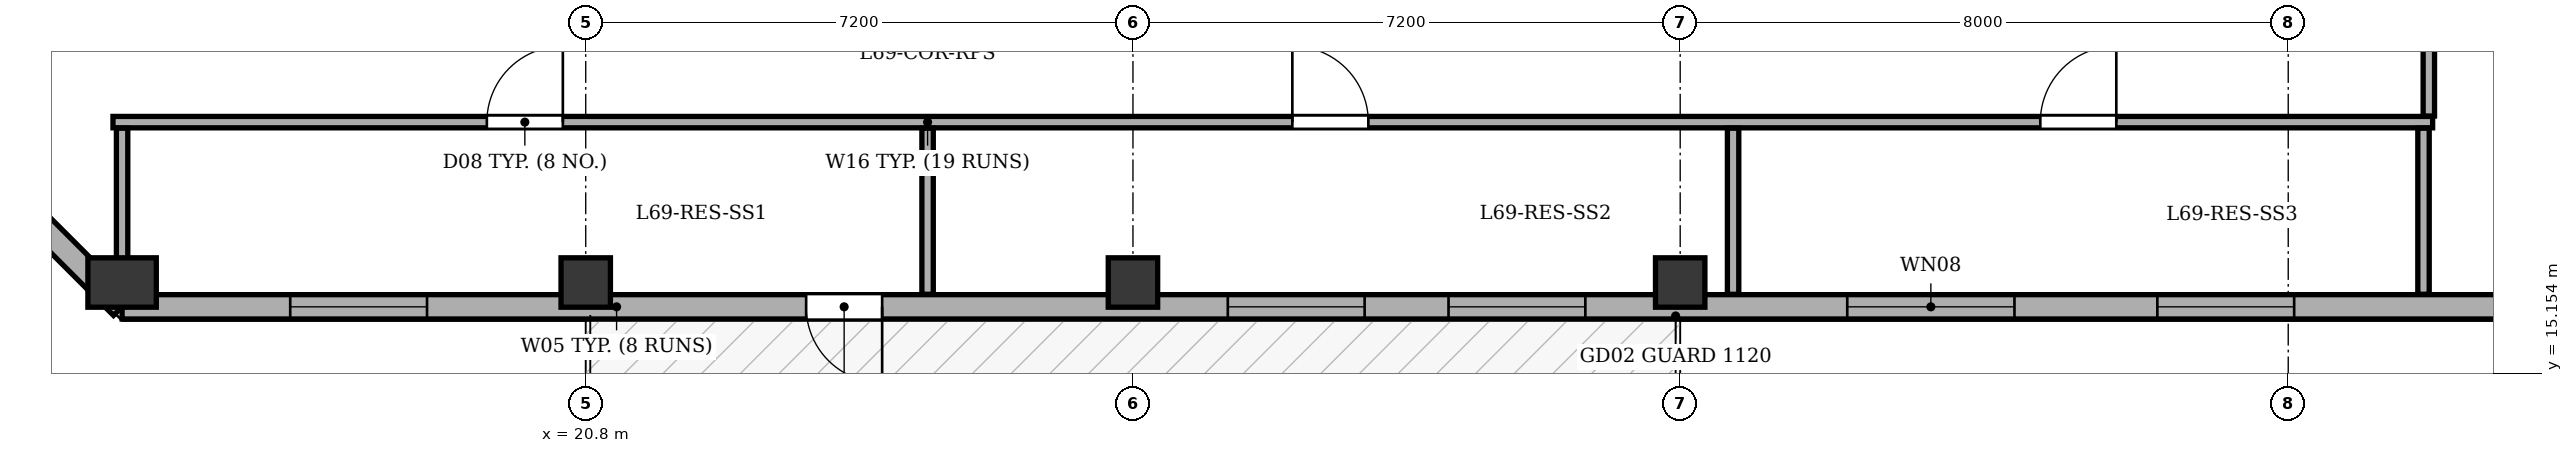
"""IFC4 building model, lengths in metres.
Left out: names, types, materials, properties, quantities, classifications, styles, units other than length and angle.
Written with IfcOpenShell. Run it as: python <this file> out.ifc"""

import sys

from ifc_helpers import new_model, si_unit, direction, frame, frame_2d, origin, origin_2d, place, context, subcontext, project, spatial, rectangle, extrude, element, fill, save


model = new_model("IFC4")
c1 = context("Model", 3, precision=1e-05, world=origin(), true_north=direction((0.0, 1.0)))
c2 = subcontext(c1, "Body", "Model", "MODEL_VIEW")
j1 = project(units=[si_unit("LENGTHUNIT", "METRE"), si_unit("PLANEANGLEUNIT", "RADIAN")], contexts=[c1])
p1 = place(None, origin())
s1 = spatial("IfcSite", under=j1, at=p1, CompositionType="ELEMENT")
p2 = place(p1, origin())
s2 = spatial("IfcBuilding", under=s1, at=p2, CompositionType="ELEMENT")
p3 = place(p2, frame((0.0, 0.0, 261.9)))
s3 = spatial("IfcBuildingStorey", under=s2, at=p3, CompositionType="ELEMENT", Elevation=261.9)
p4 = place(p3, frame((14.7, 16.35, 0.0), z_axis=(0.0, 0.0, 1.0), x_axis=(1.0, 0.0, 0.0)))
e1 = element("IfcColumn", 1, at=p4, inside=s3, PredefinedType="COLUMN", context=c2, shape_type="SweptSolid", body=[
    extrude(rectangle(XDim=0.65, YDim=0.9, at=origin_2d()), origin(), (0.0, 0.0, 1.0), 3.4),
])
for number, where, z_axis, x_axis in (
    (2, (20.8, 16.35, 0.0), (0.0, 0.0, 1.0), (1.0, 0.0, 0.0)),
    (3, (28.0, 16.35, 0.0), (0.0, 0.0, 1.0), (1.0, 0.0, 0.0)),
    (4, (35.2, 16.35, 0.0), (0.0, 0.0, 1.0), (1.0, 0.0, 0.0)),
):
    element("IfcColumn", number, at=place(p3, frame(where, z_axis=z_axis, x_axis=x_axis)), inside=s3, PredefinedType="COLUMN", context=c2, shape_type="SweptSolid", body=[
        extrude(rectangle(XDim=0.65, YDim=0.65, at=origin_2d()), origin(), (0.0, 0.0, 1.0), 3.4),
    ])
p5 = place(p3, frame((51.7, 16.03, 0.0), z_axis=(0.0, 0.0, 1.0), x_axis=(-1.0, 0.0, 0.0)))
e5 = element("IfcWall", 5, at=p5, inside=s3, PredefinedType="STANDARD", context=c2, shape_type="SweptSolid", body=[
    extrude(rectangle(XDim=37.0, YDim=0.32, at=frame_2d((18.5, 0.0))), origin(), (0.0, 0.0, 1.0), 2.725),
])
p6 = place(p5, frame((27.0, 0.0, 0.0)))
e6 = element("IfcOpeningElement", 6, at=p6, cuts=e5, PredefinedType="OPENING", context=c2, shape_type="SweptSolid", body=[
    extrude(rectangle(XDim=1.0, YDim=2.02, at=frame_2d((0.5, 1.01))), frame((0.0, 0.17, 0.0), z_axis=(0.0, -1.0, 0.0), x_axis=(1.0, 0.0, 0.0)), (0.0, 0.0, 1.0), 0.34),
])
p7 = place(p5, frame((1.235, 0.0, 0.75)))
e7 = element("IfcOpeningElement", 7, at=p7, cuts=e5, PredefinedType="OPENING", context=c2, shape_type="SweptSolid", body=[
    extrude(rectangle(XDim=1.8, YDim=1.7, at=frame_2d((0.9, 0.85))), frame((0.0, 0.17, 0.0), z_axis=(0.0, -1.0, 0.0), x_axis=(1.0, 0.0, 0.0)), (0.0, 0.0, 1.0), 0.34),
])
p8 = place(p5, frame((3.885, 0.0, 0.75)))
e8 = element("IfcOpeningElement", 8, at=p8, cuts=e5, PredefinedType="OPENING", context=c2, shape_type="SweptSolid", body=[
    extrude(rectangle(XDim=1.8, YDim=1.7, at=frame_2d((0.9, 0.85))), frame((0.0, 0.17, 0.0), z_axis=(0.0, -1.0, 0.0), x_axis=(1.0, 0.0, 0.0)), (0.0, 0.0, 1.0), 0.34),
])
p9 = place(p5, frame((8.422, 0.0, 0.75)))
e9 = element("IfcOpeningElement", 9, at=p9, cuts=e5, PredefinedType="OPENING", context=c2, shape_type="SweptSolid", body=[
    extrude(rectangle(XDim=1.8, YDim=1.7, at=frame_2d((0.9, 0.85))), frame((0.0, 0.17, 0.0), z_axis=(0.0, -1.0, 0.0), x_axis=(1.0, 0.0, 0.0)), (0.0, 0.0, 1.0), 0.34),
])
p10 = place(p5, frame((12.102, 0.0, 0.75)))
e10 = element("IfcOpeningElement", 10, at=p10, cuts=e5, PredefinedType="OPENING", context=c2, shape_type="SweptSolid", body=[
    extrude(rectangle(XDim=2.2, YDim=1.7, at=frame_2d((1.1, 0.85))), frame((0.0, 0.17, 0.0), z_axis=(0.0, -1.0, 0.0), x_axis=(1.0, 0.0, 0.0)), (0.0, 0.0, 1.0), 0.34),
])
p11 = place(p5, frame((17.748, 0.0, 0.75)))
e11 = element("IfcOpeningElement", 11, at=p11, cuts=e5, PredefinedType="OPENING", context=c2, shape_type="SweptSolid", body=[
    extrude(rectangle(XDim=1.8, YDim=1.7, at=frame_2d((0.9, 0.85))), frame((0.0, 0.17, 0.0), z_axis=(0.0, -1.0, 0.0), x_axis=(1.0, 0.0, 0.0)), (0.0, 0.0, 1.0), 0.34),
])
p12 = place(p5, frame((20.652, 0.0, 0.75)))
e12 = element("IfcOpeningElement", 12, at=p12, cuts=e5, PredefinedType="OPENING", context=c2, shape_type="SweptSolid", body=[
    extrude(rectangle(XDim=1.8, YDim=1.7, at=frame_2d((0.9, 0.85))), frame((0.0, 0.17, 0.0), z_axis=(0.0, -1.0, 0.0), x_axis=(1.0, 0.0, 0.0)), (0.0, 0.0, 1.0), 0.34),
])
p13 = place(p5, frame((32.988, 0.0, 0.75)))
e13 = element("IfcOpeningElement", 13, at=p13, cuts=e5, PredefinedType="OPENING", context=c2, shape_type="SweptSolid", body=[
    extrude(rectangle(XDim=1.8, YDim=1.7, at=frame_2d((0.9, 0.85))), frame((0.0, 0.17, 0.0), z_axis=(0.0, -1.0, 0.0), x_axis=(1.0, 0.0, 0.0)), (0.0, 0.0, 1.0), 0.34),
])
p14 = place(p3, frame((14.7, 16.03, 0.0), z_axis=(0.0, 0.0, 1.0), x_axis=(-0.707106781187, 0.707106781187, 0.0)))
e14 = element("IfcWall", 14, at=p14, inside=s3, PredefinedType="STANDARD", context=c2, shape_type="SweptSolid", body=[
    extrude(rectangle(XDim=5.402, YDim=0.32, at=frame_2d((2.701, 0.0))), origin(), (0.0, 0.0, 1.0), 2.725),
])
p15 = place(p14, frame((2.001, 0.0, 0.75)))
e15 = element("IfcOpeningElement", 15, at=p15, cuts=e14, PredefinedType="OPENING", context=c2, shape_type="SweptSolid", body=[
    extrude(rectangle(XDim=1.4, YDim=1.65, at=frame_2d((0.7, 0.825))), frame((0.0, 0.17, 0.0), z_axis=(0.0, -1.0, 0.0), x_axis=(1.0, 0.0, 0.0)), (0.0, 0.0, 1.0), 0.34),
])
p16 = place(p3, frame((14.58, 18.46, 0.0), z_axis=(0.0, 0.0, 1.0), x_axis=(1.0, 0.0, 0.0)))
e16 = element("IfcWall", 16, at=p16, inside=s3, PredefinedType="PARTITIONING", context=c2, shape_type="SweptSolid", body=[
    extrude(rectangle(XDim=30.52, YDim=0.15, at=frame_2d((15.26, 0.0))), origin(), (0.0, 0.0, 1.0), 3.1),
])
p17 = place(p16, frame((4.919, 0.0, 0.0)))
e17 = element("IfcOpeningElement", 17, at=p17, cuts=e16, PredefinedType="OPENING", context=c2, shape_type="SweptSolid", body=[
    extrude(rectangle(XDim=1.0, YDim=2.1, at=frame_2d((0.5, 1.05))), frame((0.0, 0.085, 0.0), z_axis=(0.0, -1.0, 0.0), x_axis=(1.0, 0.0, 0.0)), (0.0, 0.0, 1.0), 0.17),
])
p18 = place(p16, frame((15.517, 0.0, 0.0)))
e18 = element("IfcOpeningElement", 18, at=p18, cuts=e16, PredefinedType="OPENING", context=c2, shape_type="SweptSolid", body=[
    extrude(rectangle(XDim=1.0, YDim=2.1, at=frame_2d((0.5, 1.05))), frame((0.0, 0.085, 0.0), z_axis=(0.0, -1.0, 0.0), x_axis=(1.0, 0.0, 0.0)), (0.0, 0.0, 1.0), 0.17),
])
p19 = place(p16, frame((25.358, 0.0, 0.0)))
e19 = element("IfcOpeningElement", 19, at=p19, cuts=e16, PredefinedType="OPENING", context=c2, shape_type="SweptSolid", body=[
    extrude(rectangle(XDim=1.0, YDim=2.1, at=frame_2d((0.5, 1.05))), frame((0.0, 0.085, 0.0), z_axis=(0.0, -1.0, 0.0), x_axis=(1.0, 0.0, 0.0)), (0.0, 0.0, 1.0), 0.17),
])
for number, where, z_axis, x_axis in (
    (20, (14.7, 16.195, 0.0), (0.0, 0.0, 1.0), (0.0, 1.0, 0.0)),
    (21, (25.298, 16.195, 0.0), (0.0, 0.0, 1.0), (0.0, 1.0, 0.0)),
    (22, (35.896, 16.195, 0.0), (0.0, 0.0, 1.0), (0.0, 1.0, 0.0)),
):
    element("IfcWall", number, at=place(p3, frame(where, z_axis=z_axis, x_axis=x_axis)), inside=s3, PredefinedType="PARTITIONING", context=c2, shape_type="SweptSolid", body=[
        extrude(rectangle(XDim=2.185, YDim=0.15, at=frame_2d((1.092, 0.0))), origin(), (0.0, 0.0, 1.0), 3.1),
    ])
p20 = place(p3, frame((44.98, 16.195, 0.0), z_axis=(0.0, 0.0, 1.0), x_axis=(0.0, 1.0, 0.0)))
e23 = element("IfcWall", 23, at=p20, inside=s3, PredefinedType="PARTITIONING", context=c2, shape_type="SweptSolid", body=[
    extrude(rectangle(XDim=2.185, YDim=0.15, at=frame_2d((1.092, 0.0))), origin(), (0.0, 0.0, 1.0), 2.725),
])
p21 = place(p3, frame((45.05, 19.5, 0.0), z_axis=(0.0, 0.0, 1.0), x_axis=(0.0, -1.0, 0.0)))
e24 = element("IfcWall", 24, at=p21, inside=s3, PredefinedType="PARTITIONING", context=c2, shape_type="SweptSolid", body=[
    extrude(rectangle(XDim=0.96, YDim=0.15, at=frame_2d((0.48, 0.0))), origin(), (0.0, 0.0, 1.0), 2.725),
])
p22 = place(p6, origin())
e25 = element("IfcDoor", 25, at=p22, inside=s3, OperationType="SINGLE_SWING_LEFT", PredefinedType="DOOR", context=c2, shape_type="SweptSolid", body=[
    extrude(rectangle(XDim=1.0, YDim=2.02, at=frame_2d((0.5, 1.01))), frame((0.0, 0.025, 0.0), z_axis=(0.0, -1.0, 0.0), x_axis=(1.0, 0.0, 0.0)), (0.0, 0.0, 1.0), 0.05),
])
fill(e6, e25)
p23 = place(p9, origin())
e26 = element("IfcWindow", 26, at=p23, inside=s3, PartitioningType="SINGLE_PANEL", PredefinedType="WINDOW", context=c2, shape_type="SweptSolid", body=[
    extrude(rectangle(XDim=1.8, YDim=1.7, at=frame_2d((0.9, 0.85))), frame((0.0, -0.01, 0.0), z_axis=(0.0, -1.0, 0.0), x_axis=(1.0, 0.0, 0.0)), (0.0, 0.0, 1.0), 0.06),
])
fill(e9, e26)
p24 = place(p10, origin())
e27 = element("IfcWindow", 27, at=p24, inside=s3, PartitioningType="SINGLE_PANEL", PredefinedType="WINDOW", context=c2, shape_type="SweptSolid", body=[
    extrude(rectangle(XDim=2.2, YDim=1.7, at=frame_2d((1.1, 0.85))), frame((0.0, -0.01, 0.0), z_axis=(0.0, -1.0, 0.0), x_axis=(1.0, 0.0, 0.0)), (0.0, 0.0, 1.0), 0.06),
])
fill(e10, e27)
p25 = place(p11, origin())
e28 = element("IfcWindow", 28, at=p25, inside=s3, PartitioningType="SINGLE_PANEL", PredefinedType="WINDOW", context=c2, shape_type="SweptSolid", body=[
    extrude(rectangle(XDim=1.8, YDim=1.7, at=frame_2d((0.9, 0.85))), frame((0.0, -0.01, 0.0), z_axis=(0.0, -1.0, 0.0), x_axis=(1.0, 0.0, 0.0)), (0.0, 0.0, 1.0), 0.06),
])
fill(e11, e28)
p26 = place(p12, origin())
e29 = element("IfcWindow", 29, at=p26, inside=s3, PartitioningType="SINGLE_PANEL", PredefinedType="WINDOW", context=c2, shape_type="SweptSolid", body=[
    extrude(rectangle(XDim=1.8, YDim=1.7, at=frame_2d((0.9, 0.85))), frame((0.0, -0.01, 0.0), z_axis=(0.0, -1.0, 0.0), x_axis=(1.0, 0.0, 0.0)), (0.0, 0.0, 1.0), 0.06),
])
fill(e12, e29)
p27 = place(p13, origin())
e30 = element("IfcWindow", 30, at=p27, inside=s3, PartitioningType="SINGLE_PANEL", PredefinedType="WINDOW", context=c2, shape_type="SweptSolid", body=[
    extrude(rectangle(XDim=1.8, YDim=1.7, at=frame_2d((0.9, 0.85))), frame((0.0, -0.01, 0.0), z_axis=(0.0, -1.0, 0.0), x_axis=(1.0, 0.0, 0.0)), (0.0, 0.0, 1.0), 0.06),
])
fill(e13, e30)
p28 = place(p17, origin())
e31 = element("IfcDoor", 31, at=p28, inside=s3, OperationType="SINGLE_SWING_RIGHT", PredefinedType="DOOR", context=c2, shape_type="SweptSolid", body=[
    extrude(rectangle(XDim=1.0, YDim=2.1, at=frame_2d((0.5, 1.05))), frame((0.0, 0.025, 0.0), z_axis=(0.0, -1.0, 0.0), x_axis=(1.0, 0.0, 0.0)), (0.0, 0.0, 1.0), 0.05),
])
fill(e17, e31)
p29 = place(p18, origin())
e32 = element("IfcDoor", 32, at=p29, inside=s3, OperationType="SINGLE_SWING_LEFT", PredefinedType="DOOR", context=c2, shape_type="SweptSolid", body=[
    extrude(rectangle(XDim=1.0, YDim=2.1, at=frame_2d((0.5, 1.05))), frame((0.0, 0.025, 0.0), z_axis=(0.0, -1.0, 0.0), x_axis=(1.0, 0.0, 0.0)), (0.0, 0.0, 1.0), 0.05),
])
fill(e18, e32)
p30 = place(p19, origin())
e33 = element("IfcDoor", 33, at=p30, inside=s3, OperationType="SINGLE_SWING_RIGHT", PredefinedType="DOOR", context=c2, shape_type="SweptSolid", body=[
    extrude(rectangle(XDim=1.0, YDim=2.1, at=frame_2d((0.5, 1.05))), frame((0.0, 0.025, 0.0), z_axis=(0.0, -1.0, 0.0), x_axis=(1.0, 0.0, 0.0)), (0.0, 0.0, 1.0), 0.05),
])
fill(e19, e33)
save(model, sys.argv[1])
